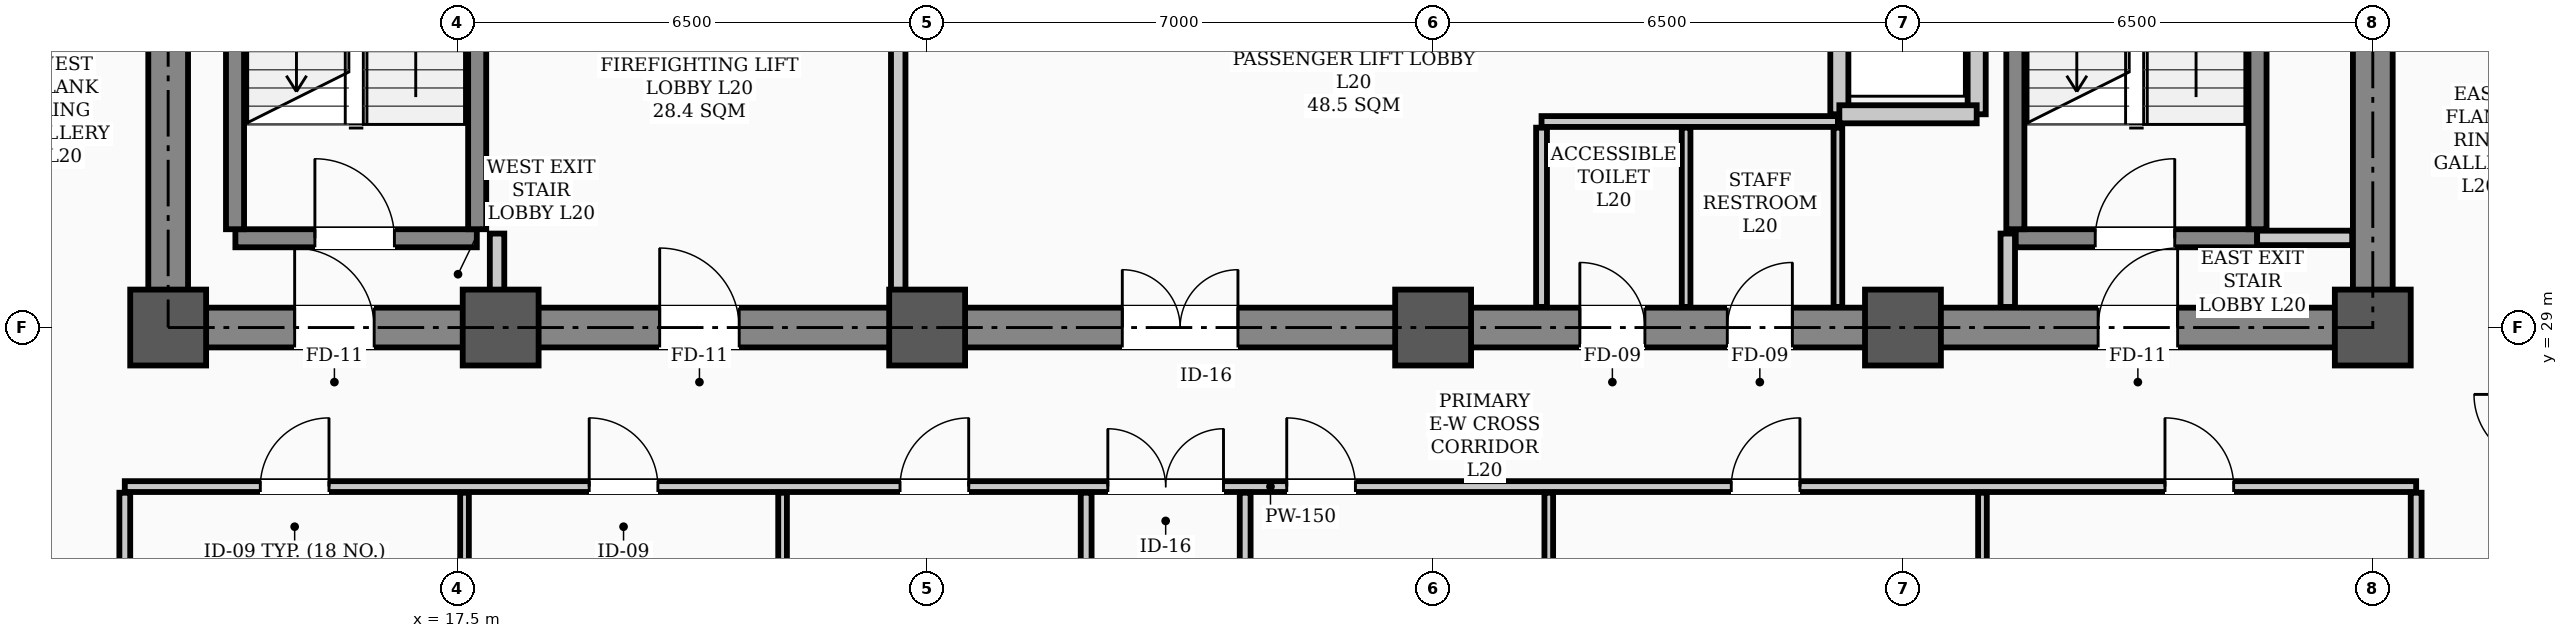
"""IFC4 building model, lengths in metres.
Left out: names, types, materials, properties, quantities, classifications, styles, units other than length and angle.
Written with IfcOpenShell. Run it as: python <this file> out.ifc"""

import sys

from ifc_helpers import new_model, si_unit, direction, frame, frame_2d, origin, origin_2d, place, context, subcontext, project, spatial, rectangle, hollow_rectangle, extrude, element, fill, save


model = new_model("IFC4")
c1 = context("Model", 3, precision=1e-05, world=origin(), true_north=direction((0.0, 1.0)))
c2 = subcontext(c1, "Body", "Model", "MODEL_VIEW")
j1 = project(units=[si_unit("LENGTHUNIT", "METRE"), si_unit("PLANEANGLEUNIT", "RADIAN")], contexts=[c1])
p1 = place(None, origin())
s1 = spatial("IfcSite", under=j1, at=p1, CompositionType="ELEMENT")
p2 = place(p1, origin())
s2 = spatial("IfcBuilding", under=s1, at=p2, CompositionType="ELEMENT")
p3 = place(p2, frame((0.0, 0.0, 81.1)))
s3 = spatial("IfcBuildingStorey", under=s2, at=p3, CompositionType="ELEMENT", Elevation=81.1)
for number, where, z_axis, x_axis in (
    (1, (13.5, 29.0, 0.0), (0.0, 0.0, 1.0), (1.0, 0.0, 0.0)),
    (2, (18.1, 29.0, 0.0), (0.0, 0.0, 1.0), (1.0, 0.0, 0.0)),
    (3, (24.0, 29.0, 0.0), (0.0, 0.0, 1.0), (1.0, 0.0, 0.0)),
    (4, (31.0, 29.0, 0.0), (0.0, 0.0, 1.0), (1.0, 0.0, 0.0)),
    (5, (37.5, 29.0, 0.0), (0.0, 0.0, 1.0), (1.0, 0.0, 0.0)),
    (6, (44.0, 29.0, 0.0), (0.0, 0.0, 1.0), (1.0, 0.0, 0.0)),
):
    element("IfcColumn", number, at=place(p3, frame(where, z_axis=z_axis, x_axis=x_axis)), inside=s3, PredefinedType="COLUMN", context=c2, shape_type="SweptSolid", body=[
        extrude(hollow_rectangle(XDim=1.05, YDim=1.05, WallThickness=0.038, InnerFilletRadius=0.019, OuterFilletRadius=0.057, at=origin_2d()), origin(), (0.0, 0.0, 1.0), 3.9),
    ])
p4 = place(p3, frame((13.5, 29.0, 0.0), z_axis=(0.0, 0.0, 1.0), x_axis=(1.0, 0.0, 0.0)))
e7 = element("IfcWall", 7, at=p4, inside=s3, PredefinedType="SHEAR", context=c2, shape_type="SweptSolid", body=[
    extrude(rectangle(XDim=30.5, YDim=0.55, at=frame_2d((15.25, 0.0))), origin(), (0.0, 0.0, 1.0), 3.72),
])
p5 = place(p4, frame((1.75, 0.0, 0.0)))
e8 = element("IfcOpeningElement", 8, at=p5, cuts=e7, PredefinedType="OPENING", context=c2, shape_type="SweptSolid", body=[
    extrude(rectangle(XDim=1.1, YDim=2.08, at=frame_2d((0.55, 1.04))), frame((0.0, 0.285, 0.0), z_axis=(0.0, -1.0, 0.0), x_axis=(1.0, 0.0, 0.0)), (0.0, 0.0, 1.0), 0.57),
])
p6 = place(p4, frame((26.7, 0.0, 0.0)))
e9 = element("IfcOpeningElement", 9, at=p6, cuts=e7, PredefinedType="OPENING", context=c2, shape_type="SweptSolid", body=[
    extrude(rectangle(XDim=1.1, YDim=2.08, at=frame_2d((0.55, 1.04))), frame((0.0, 0.285, 0.0), z_axis=(0.0, -1.0, 0.0), x_axis=(1.0, 0.0, 0.0)), (0.0, 0.0, 1.0), 0.57),
])
p7 = place(p4, frame((6.8, 0.0, 0.0)))
e10 = element("IfcOpeningElement", 10, at=p7, cuts=e7, PredefinedType="OPENING", context=c2, shape_type="SweptSolid", body=[
    extrude(rectangle(XDim=1.1, YDim=2.08, at=frame_2d((0.55, 1.04))), frame((0.0, 0.285, 0.0), z_axis=(0.0, -1.0, 0.0), x_axis=(1.0, 0.0, 0.0)), (0.0, 0.0, 1.0), 0.57),
])
p8 = place(p4, frame((13.2, 0.0, 0.0)))
e11 = element("IfcOpeningElement", 11, at=p8, cuts=e7, PredefinedType="OPENING", context=c2, shape_type="SweptSolid", body=[
    extrude(rectangle(XDim=1.6, YDim=2.08, at=frame_2d((0.8, 1.04))), frame((0.0, 0.285, 0.0), z_axis=(0.0, -1.0, 0.0), x_axis=(1.0, 0.0, 0.0)), (0.0, 0.0, 1.0), 0.57),
])
p9 = place(p4, frame((19.53, 0.0, 0.0)))
e12 = element("IfcOpeningElement", 12, at=p9, cuts=e7, PredefinedType="OPENING", context=c2, shape_type="SweptSolid", body=[
    extrude(rectangle(XDim=0.9, YDim=2.08, at=frame_2d((0.45, 1.04))), frame((0.0, 0.285, 0.0), z_axis=(0.0, -1.0, 0.0), x_axis=(1.0, 0.0, 0.0)), (0.0, 0.0, 1.0), 0.57),
])
p10 = place(p4, frame((21.57, 0.0, 0.0)))
e13 = element("IfcOpeningElement", 13, at=p10, cuts=e7, PredefinedType="OPENING", context=c2, shape_type="SweptSolid", body=[
    extrude(rectangle(XDim=0.9, YDim=2.08, at=frame_2d((0.45, 1.04))), frame((0.0, 0.285, 0.0), z_axis=(0.0, -1.0, 0.0), x_axis=(1.0, 0.0, 0.0)), (0.0, 0.0, 1.0), 0.57),
])
for number, where, z_axis, x_axis in (
    (14, (13.5, 29.35, 0.0), (0.0, 0.0, 1.0), (0.0, 1.0, 0.0)),
    (15, (44.0, 29.35, 0.0), (0.0, 0.0, 1.0), (0.0, 1.0, 0.0)),
):
    element("IfcWall", number, at=place(p3, frame(where, z_axis=z_axis, x_axis=x_axis)), inside=s3, PredefinedType="SHEAR", context=c2, shape_type="SweptSolid", body=[
        extrude(rectangle(XDim=8.6, YDim=0.55, at=frame_2d((4.3, 0.0))), origin(), (0.0, 0.0, 1.0), 3.72),
    ])
p11 = place(p3, frame((14.43, 30.235, 0.0), z_axis=(0.0, 0.0, 1.0), x_axis=(1.0, 0.0, 0.0)))
e16 = element("IfcWall", 16, at=p11, inside=s3, PredefinedType="STANDARD", context=c2, shape_type="SweptSolid", body=[
    extrude(rectangle(XDim=3.34, YDim=0.25, at=frame_2d((1.67, 0.0))), origin(), (0.0, 0.0, 1.0), 3.72),
])
p12 = place(p11, frame((1.1, 0.0, 0.0)))
e17 = element("IfcOpeningElement", 17, at=p12, cuts=e16, PredefinedType="OPENING", context=c2, shape_type="SweptSolid", body=[
    extrude(rectangle(XDim=1.1, YDim=2.08, at=frame_2d((0.55, 1.04))), frame((0.0, 0.135, 0.0), z_axis=(0.0, -1.0, 0.0), x_axis=(1.0, 0.0, 0.0)), (0.0, 0.0, 1.0), 0.27),
])
for number, where, z_axis, x_axis in (
    (18, (14.425, 30.36, 0.0), (0.0, 0.0, 1.0), (0.0, 1.0, 0.0)),
    (19, (17.775, 30.36, 0.0), (0.0, 0.0, 1.0), (0.0, 1.0, 0.0)),
):
    element("IfcWall", number, at=place(p3, frame(where, z_axis=z_axis, x_axis=x_axis)), inside=s3, PredefinedType="STANDARD", context=c2, shape_type="SweptSolid", body=[
        extrude(rectangle(XDim=7.184, YDim=0.25, at=frame_2d((3.592, 0.0))), origin(), (0.0, 0.0, 1.0), 3.72),
    ])
p13 = place(p3, frame((39.06, 30.235, 0.0), z_axis=(0.0, 0.0, 1.0), x_axis=(1.0, 0.0, 0.0)))
e20 = element("IfcWall", 20, at=p13, inside=s3, PredefinedType="STANDARD", context=c2, shape_type="SweptSolid", body=[
    extrude(rectangle(XDim=3.34, YDim=0.25, at=frame_2d((1.67, 0.0))), origin(), (0.0, 0.0, 1.0), 3.72),
])
p14 = place(p13, frame((1.1, 0.0, 0.0)))
e21 = element("IfcOpeningElement", 21, at=p14, cuts=e20, PredefinedType="OPENING", context=c2, shape_type="SweptSolid", body=[
    extrude(rectangle(XDim=1.1, YDim=2.08, at=frame_2d((0.55, 1.04))), frame((0.0, 0.135, 0.0), z_axis=(0.0, -1.0, 0.0), x_axis=(1.0, 0.0, 0.0)), (0.0, 0.0, 1.0), 0.27),
])
for number, where, z_axis, x_axis in (
    (22, (39.055, 30.36, 0.0), (0.0, 0.0, 1.0), (0.0, 1.0, 0.0)),
    (23, (42.405, 30.36, 0.0), (0.0, 0.0, 1.0), (0.0, 1.0, 0.0)),
):
    element("IfcWall", number, at=place(p3, frame(where, z_axis=z_axis, x_axis=x_axis)), inside=s3, PredefinedType="STANDARD", context=c2, shape_type="SweptSolid", body=[
        extrude(rectangle(XDim=7.184, YDim=0.25, at=frame_2d((3.592, 0.0))), origin(), (0.0, 0.0, 1.0), 3.72),
    ])
p15 = place(p3, frame((36.62, 31.95, 0.0), z_axis=(0.0, 0.0, 1.0), x_axis=(0.0, 1.0, 0.0)))
e24 = element("IfcWall", 24, at=p15, inside=s3, PredefinedType="STANDARD", context=c2, shape_type="SweptSolid", body=[
    extrude(rectangle(XDim=6.0, YDim=0.25, at=frame_2d((3.0, 0.0))), origin(), (0.0, 0.0, 1.0), 3.3),
])
p16 = place(p15, frame((0.9, 0.0, 0.0)))
e25 = element("IfcOpeningElement", 25, at=p16, cuts=e24, PredefinedType="OPENING", context=c2, shape_type="SweptSolid", body=[
    extrude(rectangle(XDim=1.1, YDim=2.08, at=frame_2d((0.55, 1.04))), frame((0.0, 0.135, 0.0), z_axis=(0.0, -1.0, 0.0), x_axis=(1.0, 0.0, 0.0)), (0.0, 0.0, 1.0), 0.27),
])
p17 = place(p15, frame((4.0, 0.0, 0.0)))
e26 = element("IfcOpeningElement", 26, at=p17, cuts=e24, PredefinedType="OPENING", context=c2, shape_type="SweptSolid", body=[
    extrude(rectangle(XDim=1.1, YDim=2.08, at=frame_2d((0.55, 1.04))), frame((0.0, 0.135, 0.0), z_axis=(0.0, -1.0, 0.0), x_axis=(1.0, 0.0, 0.0)), (0.0, 0.0, 1.0), 0.27),
])
p18 = place(p3, frame((38.52, 31.95, 0.0), z_axis=(0.0, 0.0, 1.0), x_axis=(0.0, 1.0, 0.0)))
e27 = element("IfcWall", 27, at=p18, inside=s3, PredefinedType="STANDARD", context=c2, shape_type="SweptSolid", body=[
    extrude(rectangle(XDim=6.0, YDim=0.25, at=frame_2d((3.0, 0.0))), origin(), (0.0, 0.0, 1.0), 3.3),
])
p19 = place(p3, frame((36.62, 31.95, 0.0), z_axis=(0.0, 0.0, 1.0), x_axis=(1.0, 0.0, 0.0)))
e28 = element("IfcWall", 28, at=p19, inside=s3, PredefinedType="STANDARD", context=c2, shape_type="SweptSolid", body=[
    extrude(rectangle(XDim=1.9, YDim=0.25, at=frame_2d((0.95, 0.0))), origin(), (0.0, 0.0, 1.0), 3.48),
])
p20 = place(p3, frame((42.4, 30.24, 0.0), z_axis=(0.0, 0.0, 1.0), x_axis=(1.0, 0.0, 0.0)))
e29 = element("IfcWall", 29, at=p20, inside=s3, PredefinedType="STANDARD", context=c2, shape_type="SweptSolid", body=[
    extrude(rectangle(XDim=1.315, YDim=0.2, at=frame_2d((0.658, 0.0))), origin(), (0.0, 0.0, 1.0), 3.1),
])
p21 = place(p3, frame((32.5, 31.85, 0.0), z_axis=(0.0, 0.0, 1.0), x_axis=(1.0, 0.0, 0.0)))
e30 = element("IfcWall", 30, at=p21, inside=s3, PredefinedType="PARTITIONING", context=c2, shape_type="SweptSolid", body=[
    extrude(rectangle(XDim=4.1, YDim=0.15, at=frame_2d((2.05, 0.0))), origin(), (0.0, 0.0, 1.0), 3.72),
])
p22 = place(p3, frame((12.9, 26.8, 0.0), z_axis=(0.0, 0.0, 1.0), x_axis=(1.0, 0.0, 0.0)))
e31 = element("IfcWall", 31, at=p22, inside=s3, PredefinedType="PARTITIONING", context=c2, shape_type="SweptSolid", body=[
    extrude(rectangle(XDim=31.7, YDim=0.15, at=frame_2d((15.85, 0.0))), origin(), (0.0, 0.0, 1.0), 3.1),
])
p23 = place(p22, frame((13.6, 0.0, 0.0)))
e32 = element("IfcOpeningElement", 32, at=p23, cuts=e31, PredefinedType="OPENING", context=c2, shape_type="SweptSolid", body=[
    extrude(rectangle(XDim=1.6, YDim=2.08, at=frame_2d((0.8, 1.04))), frame((0.0, 0.085, 0.0), z_axis=(0.0, -1.0, 0.0), x_axis=(1.0, 0.0, 0.0)), (0.0, 0.0, 1.0), 0.17),
])
p24 = place(p22, frame((1.875, 0.0, 0.0)))
e33 = element("IfcOpeningElement", 33, at=p24, cuts=e31, PredefinedType="OPENING", context=c2, shape_type="SweptSolid", body=[
    extrude(rectangle(XDim=0.95, YDim=2.08, at=frame_2d((0.475, 1.04))), frame((0.0, 0.085, 0.0), z_axis=(0.0, -1.0, 0.0), x_axis=(1.0, 0.0, 0.0)), (0.0, 0.0, 1.0), 0.17),
])
p25 = place(p22, frame((6.425, 0.0, 0.0)))
e34 = element("IfcOpeningElement", 34, at=p25, cuts=e31, PredefinedType="OPENING", context=c2, shape_type="SweptSolid", body=[
    extrude(rectangle(XDim=0.95, YDim=2.08, at=frame_2d((0.475, 1.04))), frame((0.0, 0.085, 0.0), z_axis=(0.0, -1.0, 0.0), x_axis=(1.0, 0.0, 0.0)), (0.0, 0.0, 1.0), 0.17),
])
p26 = place(p22, frame((10.725, 0.0, 0.0)))
e35 = element("IfcOpeningElement", 35, at=p26, cuts=e31, PredefinedType="OPENING", context=c2, shape_type="SweptSolid", body=[
    extrude(rectangle(XDim=0.95, YDim=2.08, at=frame_2d((0.475, 1.04))), frame((0.0, 0.085, 0.0), z_axis=(0.0, -1.0, 0.0), x_axis=(1.0, 0.0, 0.0)), (0.0, 0.0, 1.0), 0.17),
])
p27 = place(p22, frame((16.075, 0.0, 0.0)))
e36 = element("IfcOpeningElement", 36, at=p27, cuts=e31, PredefinedType="OPENING", context=c2, shape_type="SweptSolid", body=[
    extrude(rectangle(XDim=0.95, YDim=2.08, at=frame_2d((0.475, 1.04))), frame((0.0, 0.085, 0.0), z_axis=(0.0, -1.0, 0.0), x_axis=(1.0, 0.0, 0.0)), (0.0, 0.0, 1.0), 0.17),
])
p28 = place(p22, frame((22.225, 0.0, 0.0)))
e37 = element("IfcOpeningElement", 37, at=p28, cuts=e31, PredefinedType="OPENING", context=c2, shape_type="SweptSolid", body=[
    extrude(rectangle(XDim=0.95, YDim=2.08, at=frame_2d((0.475, 1.04))), frame((0.0, 0.085, 0.0), z_axis=(0.0, -1.0, 0.0), x_axis=(1.0, 0.0, 0.0)), (0.0, 0.0, 1.0), 0.17),
])
p29 = place(p22, frame((28.225, 0.0, 0.0)))
e38 = element("IfcOpeningElement", 38, at=p29, cuts=e31, PredefinedType="OPENING", context=c2, shape_type="SweptSolid", body=[
    extrude(rectangle(XDim=0.95, YDim=2.08, at=frame_2d((0.475, 1.04))), frame((0.0, 0.085, 0.0), z_axis=(0.0, -1.0, 0.0), x_axis=(1.0, 0.0, 0.0)), (0.0, 0.0, 1.0), 0.17),
])
for number, where, z_axis, x_axis in (
    (39, (18.05, 29.285, 0.0), (0.0, 0.0, 1.0), (0.0, 1.0, 0.0)),
    (40, (38.95, 29.285, 0.0), (0.0, 0.0, 1.0), (0.0, 1.0, 0.0)),
):
    element("IfcWall", number, at=place(p3, frame(where, z_axis=z_axis, x_axis=x_axis)), inside=s3, PredefinedType="STANDARD", context=c2, shape_type="SweptSolid", body=[
        extrude(rectangle(XDim=1.015, YDim=0.2, at=frame_2d((0.508, 0.0))), origin(), (0.0, 0.0, 1.0), 3.3),
    ])
p30 = place(p3, frame((23.6, 29.285, 0.0), z_axis=(0.0, 0.0, 1.0), x_axis=(0.0, 1.0, 0.0)))
e41 = element("IfcWall", 41, at=p30, inside=s3, PredefinedType="STANDARD", context=c2, shape_type="SweptSolid", body=[
    extrude(rectangle(XDim=5.415, YDim=0.2, at=frame_2d((2.708, 0.0))), origin(), (0.0, 0.0, 1.0), 3.1),
])
p31 = place(p3, frame((32.5, 29.285, 0.0), z_axis=(0.0, 0.0, 1.0), x_axis=(0.0, 1.0, 0.0)))
e42 = element("IfcWall", 42, at=p31, inside=s3, PredefinedType="PARTITIONING", context=c2, shape_type="SweptSolid", body=[
    extrude(rectangle(XDim=2.48, YDim=0.15, at=frame_2d((1.24, 0.0))), origin(), (0.0, 0.0, 1.0), 3.3),
])
for number, where, z_axis, x_axis in (
    (43, (36.6, 29.285, 0.0), (0.0, 0.0, 1.0), (0.0, 1.0, 0.0)),
    (44, (34.5, 29.285, 0.0), (0.0, 0.0, 1.0), (0.0, 1.0, 0.0)),
):
    element("IfcWall", number, at=place(p3, frame(where, z_axis=z_axis, x_axis=x_axis)), inside=s3, PredefinedType="PARTITIONING", context=c2, shape_type="SweptSolid", body=[
        extrude(rectangle(XDim=2.48, YDim=0.12, at=frame_2d((1.24, 0.0))), origin(), (0.0, 0.0, 1.0), 3.3),
    ])
for number, where, z_axis, x_axis in (
    (45, (26.2, 19.335, 0.0), (0.0, 0.0, 1.0), (0.0, 1.0, 0.0)),
    (46, (28.4, 19.335, 0.0), (0.0, 0.0, 1.0), (0.0, 1.0, 0.0)),
    (47, (12.9, 19.335, 0.0), (0.0, 0.0, 1.0), (0.0, 1.0, 0.0)),
    (48, (44.6, 19.335, 0.0), (0.0, 0.0, 1.0), (0.0, 1.0, 0.0)),
):
    element("IfcWall", number, at=place(p3, frame(where, z_axis=z_axis, x_axis=x_axis)), inside=s3, PredefinedType="PARTITIONING", context=c2, shape_type="SweptSolid", body=[
        extrude(rectangle(XDim=7.38, YDim=0.15, at=frame_2d((3.69, 0.0))), origin(), (0.0, 0.0, 1.0), 3.0),
    ])
for number, where, z_axis, x_axis in (
    (49, (17.6, 19.335, 0.0), (0.0, 0.0, 1.0), (0.0, 1.0, 0.0)),
    (50, (22.0, 19.335, 0.0), (0.0, 0.0, 1.0), (0.0, 1.0, 0.0)),
    (51, (32.6, 19.335, 0.0), (0.0, 0.0, 1.0), (0.0, 1.0, 0.0)),
    (52, (38.6, 19.335, 0.0), (0.0, 0.0, 1.0), (0.0, 1.0, 0.0)),
):
    element("IfcWall", number, at=place(p3, frame(where, z_axis=z_axis, x_axis=x_axis)), inside=s3, PredefinedType="PARTITIONING", context=c2, shape_type="SweptSolid", body=[
        extrude(rectangle(XDim=7.38, YDim=0.12, at=frame_2d((3.69, 0.0))), origin(), (0.0, 0.0, 1.0), 3.0),
    ])
p32 = place(p12, origin())
e53 = element("IfcDoor", 53, at=p32, inside=s3, OperationType="SINGLE_SWING_LEFT", PredefinedType="DOOR", context=c2, shape_type="SweptSolid", body=[
    extrude(rectangle(XDim=1.1, YDim=2.08, at=frame_2d((0.55, 1.04))), frame((0.0, 0.025, 0.0), z_axis=(0.0, -1.0, 0.0), x_axis=(1.0, 0.0, 0.0)), (0.0, 0.0, 1.0), 0.05),
])
fill(e17, e53)
p33 = place(p14, origin())
e54 = element("IfcDoor", 54, at=p33, inside=s3, OperationType="SINGLE_SWING_RIGHT", PredefinedType="DOOR", context=c2, shape_type="SweptSolid", body=[
    extrude(rectangle(XDim=1.1, YDim=2.08, at=frame_2d((0.55, 1.04))), frame((0.0, 0.025, 0.0), z_axis=(0.0, -1.0, 0.0), x_axis=(1.0, 0.0, 0.0)), (0.0, 0.0, 1.0), 0.05),
])
fill(e21, e54)
p34 = place(p5, origin())
e55 = element("IfcDoor", 55, at=p34, inside=s3, OperationType="SINGLE_SWING_LEFT", PredefinedType="DOOR", context=c2, shape_type="SweptSolid", body=[
    extrude(rectangle(XDim=1.1, YDim=2.08, at=frame_2d((0.55, 1.04))), frame((0.0, 0.025, 0.0), z_axis=(0.0, -1.0, 0.0), x_axis=(1.0, 0.0, 0.0)), (0.0, 0.0, 1.0), 0.05),
])
fill(e8, e55)
p35 = place(p6, origin())
e56 = element("IfcDoor", 56, at=p35, inside=s3, OperationType="SINGLE_SWING_RIGHT", PredefinedType="DOOR", context=c2, shape_type="SweptSolid", body=[
    extrude(rectangle(XDim=1.1, YDim=2.08, at=frame_2d((0.55, 1.04))), frame((0.0, 0.025, 0.0), z_axis=(0.0, -1.0, 0.0), x_axis=(1.0, 0.0, 0.0)), (0.0, 0.0, 1.0), 0.05),
])
fill(e9, e56)
p36 = place(p7, origin())
e57 = element("IfcDoor", 57, at=p36, inside=s3, OperationType="SINGLE_SWING_LEFT", PredefinedType="DOOR", context=c2, shape_type="SweptSolid", body=[
    extrude(rectangle(XDim=1.1, YDim=2.08, at=frame_2d((0.55, 1.04))), frame((0.0, 0.025, 0.0), z_axis=(0.0, -1.0, 0.0), x_axis=(1.0, 0.0, 0.0)), (0.0, 0.0, 1.0), 0.05),
])
fill(e10, e57)
p37 = place(p8, origin())
e58 = element("IfcDoor", 58, at=p37, inside=s3, OperationType="DOUBLE_DOOR_SINGLE_SWING", PredefinedType="DOOR", context=c2, shape_type="SweptSolid", body=[
    extrude(rectangle(XDim=1.6, YDim=2.08, at=frame_2d((0.8, 1.04))), frame((0.0, 0.025, 0.0), z_axis=(0.0, -1.0, 0.0), x_axis=(1.0, 0.0, 0.0)), (0.0, 0.0, 1.0), 0.05),
])
fill(e11, e58)
p38 = place(p9, origin())
e59 = element("IfcDoor", 59, at=p38, inside=s3, OperationType="SINGLE_SWING_LEFT", PredefinedType="DOOR", context=c2, shape_type="SweptSolid", body=[
    extrude(rectangle(XDim=0.9, YDim=2.08, at=frame_2d((0.45, 1.04))), frame((0.0, 0.025, 0.0), z_axis=(0.0, -1.0, 0.0), x_axis=(1.0, 0.0, 0.0)), (0.0, 0.0, 1.0), 0.05),
])
fill(e12, e59)
p39 = place(p10, origin())
e60 = element("IfcDoor", 60, at=p39, inside=s3, OperationType="SINGLE_SWING_RIGHT", PredefinedType="DOOR", context=c2, shape_type="SweptSolid", body=[
    extrude(rectangle(XDim=0.9, YDim=2.08, at=frame_2d((0.45, 1.04))), frame((0.0, 0.025, 0.0), z_axis=(0.0, -1.0, 0.0), x_axis=(1.0, 0.0, 0.0)), (0.0, 0.0, 1.0), 0.05),
])
fill(e13, e60)
p40 = place(p23, origin())
e61 = element("IfcDoor", 61, at=p40, inside=s3, OperationType="DOUBLE_DOOR_SINGLE_SWING", PredefinedType="DOOR", context=c2, shape_type="SweptSolid", body=[
    extrude(rectangle(XDim=1.6, YDim=2.08, at=frame_2d((0.8, 1.04))), frame((0.0, 0.025, 0.0), z_axis=(0.0, -1.0, 0.0), x_axis=(1.0, 0.0, 0.0)), (0.0, 0.0, 1.0), 0.05),
])
fill(e32, e61)
p41 = place(p24, origin())
e62 = element("IfcDoor", 62, at=p41, inside=s3, OperationType="SINGLE_SWING_RIGHT", PredefinedType="DOOR", context=c2, shape_type="SweptSolid", body=[
    extrude(rectangle(XDim=0.95, YDim=2.08, at=frame_2d((0.475, 1.04))), frame((0.0, 0.025, 0.0), z_axis=(0.0, -1.0, 0.0), x_axis=(1.0, 0.0, 0.0)), (0.0, 0.0, 1.0), 0.05),
])
fill(e33, e62)
p42 = place(p25, origin())
e63 = element("IfcDoor", 63, at=p42, inside=s3, OperationType="SINGLE_SWING_LEFT", PredefinedType="DOOR", context=c2, shape_type="SweptSolid", body=[
    extrude(rectangle(XDim=0.95, YDim=2.08, at=frame_2d((0.475, 1.04))), frame((0.0, 0.025, 0.0), z_axis=(0.0, -1.0, 0.0), x_axis=(1.0, 0.0, 0.0)), (0.0, 0.0, 1.0), 0.05),
])
fill(e34, e63)
p43 = place(p26, origin())
e64 = element("IfcDoor", 64, at=p43, inside=s3, OperationType="SINGLE_SWING_RIGHT", PredefinedType="DOOR", context=c2, shape_type="SweptSolid", body=[
    extrude(rectangle(XDim=0.95, YDim=2.08, at=frame_2d((0.475, 1.04))), frame((0.0, 0.025, 0.0), z_axis=(0.0, -1.0, 0.0), x_axis=(1.0, 0.0, 0.0)), (0.0, 0.0, 1.0), 0.05),
])
fill(e35, e64)
p44 = place(p27, origin())
e65 = element("IfcDoor", 65, at=p44, inside=s3, OperationType="SINGLE_SWING_LEFT", PredefinedType="DOOR", context=c2, shape_type="SweptSolid", body=[
    extrude(rectangle(XDim=0.95, YDim=2.08, at=frame_2d((0.475, 1.04))), frame((0.0, 0.025, 0.0), z_axis=(0.0, -1.0, 0.0), x_axis=(1.0, 0.0, 0.0)), (0.0, 0.0, 1.0), 0.05),
])
fill(e36, e65)
p45 = place(p28, origin())
e66 = element("IfcDoor", 66, at=p45, inside=s3, OperationType="SINGLE_SWING_RIGHT", PredefinedType="DOOR", context=c2, shape_type="SweptSolid", body=[
    extrude(rectangle(XDim=0.95, YDim=2.08, at=frame_2d((0.475, 1.04))), frame((0.0, 0.025, 0.0), z_axis=(0.0, -1.0, 0.0), x_axis=(1.0, 0.0, 0.0)), (0.0, 0.0, 1.0), 0.05),
])
fill(e37, e66)
p46 = place(p29, origin())
e67 = element("IfcDoor", 67, at=p46, inside=s3, OperationType="SINGLE_SWING_LEFT", PredefinedType="DOOR", context=c2, shape_type="SweptSolid", body=[
    extrude(rectangle(XDim=0.95, YDim=2.08, at=frame_2d((0.475, 1.04))), frame((0.0, 0.025, 0.0), z_axis=(0.0, -1.0, 0.0), x_axis=(1.0, 0.0, 0.0)), (0.0, 0.0, 1.0), 0.05),
])
fill(e38, e67)
save(model, sys.argv[1])
